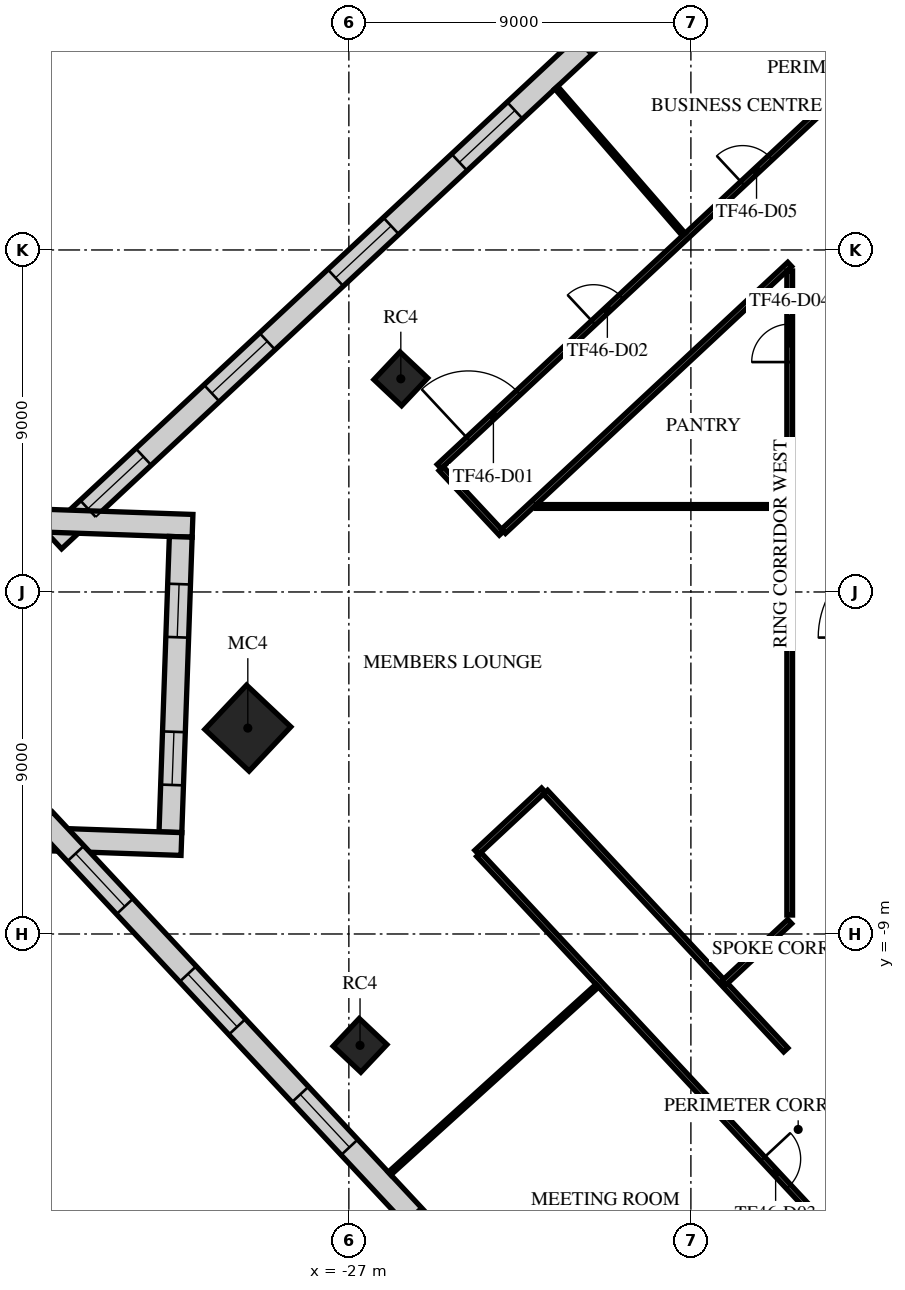
"""IFC4 building model, lengths in metres.
Left out: names, types, materials, properties, quantities, classifications, styles, units other than length and angle.
Written with IfcOpenShell. Run it as: python <this file> out.ifc"""

import sys

from ifc_helpers import new_model, si_unit, direction, frame, frame_2d, origin, origin_2d, place, context, subcontext, project, spatial, rectangle, extrude, element, fill, save


model = new_model("IFC4")
c1 = context("Model", 3, precision=1e-05, world=origin(), true_north=direction((0.0, 1.0)))
c2 = subcontext(c1, "Body", "Model", "MODEL_VIEW")
j1 = project(units=[si_unit("LENGTHUNIT", "METRE"), si_unit("PLANEANGLEUNIT", "RADIAN")], contexts=[c1])
p1 = place(None, origin())
s1 = spatial("IfcSite", under=j1, at=p1, CompositionType="ELEMENT")
p2 = place(p1, origin())
s2 = spatial("IfcBuilding", under=s1, at=p2, CompositionType="ELEMENT")
p3 = place(p2, frame((0.0, 0.0, 197.3)))
s3 = spatial("IfcBuildingStorey", under=s2, at=p3, CompositionType="ELEMENT", Elevation=197.3)
p4 = place(p3, frame((-25.633, 5.609, 0.0), z_axis=(0.0, 0.0, 1.0), x_axis=(0.685916152371, 0.727680583715, 0.0)))
e1 = element("IfcColumn", 1, at=p4, inside=s3, PredefinedType="COLUMN", context=c2, shape_type="SweptSolid", body=[
    extrude(rectangle(XDim=1.0, YDim=1.0, at=origin_2d()), origin(), (0.0, 0.0, 1.0), 4.0),
])
p5 = place(p3, frame((-29.659, -3.582, 0.0), z_axis=(0.0, 0.0, 1.0), x_axis=(0.685916152371, 0.727680583715, 0.0)))
e2 = element("IfcColumn", 2, at=p5, inside=s3, PredefinedType="COLUMN", context=c2, shape_type="SweptSolid", body=[
    extrude(rectangle(XDim=1.6, YDim=1.6, at=origin_2d()), origin(), (0.0, 0.0, 1.0), 4.0),
])
p6 = place(p3, frame((-26.706, -11.931, 0.0), z_axis=(0.0, 0.0, 1.0), x_axis=(0.685916152371, 0.727680583715, 0.0)))
e3 = element("IfcColumn", 3, at=p6, inside=s3, PredefinedType="COLUMN", context=c2, shape_type="SweptSolid", body=[
    extrude(rectangle(XDim=1.0, YDim=1.0, at=origin_2d()), origin(), (0.0, 0.0, 1.0), 4.0),
])
p7 = place(p3, frame((1.073, 34.773, 0.0), z_axis=(0.0, 0.0, 1.0), x_axis=(-0.731351780381, -0.682000420333, 0.0)))
e4 = element("IfcWall", 4, at=p7, inside=s3, PredefinedType="STANDARD", context=c2, shape_type="SweptSolid", body=[
    extrude(rectangle(XDim=49.0, YDim=0.6, at=frame_2d((24.5, 0.0))), origin(), (0.0, 0.0, 1.0), 3.62),
])
p8 = place(p7, frame((1.227, 0.0, 0.9)))
e5 = element("IfcOpeningElement", 5, at=p8, cuts=e4, PredefinedType="OPENING", context=c2, shape_type="SweptSolid", body=[
    extrude(rectangle(XDim=2.0, YDim=2.1, at=frame_2d((1.0, 1.05))), frame((0.0, 0.31, 0.0), z_axis=(0.0, -1.0, 0.0), x_axis=(1.0, 0.0, 0.0)), (0.0, 0.0, 1.0), 0.62),
])
p9 = place(p7, frame((5.682, 0.0, 0.9)))
e6 = element("IfcOpeningElement", 6, at=p9, cuts=e4, PredefinedType="OPENING", context=c2, shape_type="SweptSolid", body=[
    extrude(rectangle(XDim=2.0, YDim=2.1, at=frame_2d((1.0, 1.05))), frame((0.0, 0.31, 0.0), z_axis=(0.0, -1.0, 0.0), x_axis=(1.0, 0.0, 0.0)), (0.0, 0.0, 1.0), 0.62),
])
p10 = place(p7, frame((14.591, 0.0, 0.9)))
e7 = element("IfcOpeningElement", 7, at=p10, cuts=e4, PredefinedType="OPENING", context=c2, shape_type="SweptSolid", body=[
    extrude(rectangle(XDim=2.0, YDim=2.1, at=frame_2d((1.0, 1.05))), frame((0.0, 0.31, 0.0), z_axis=(0.0, -1.0, 0.0), x_axis=(1.0, 0.0, 0.0)), (0.0, 0.0, 1.0), 0.62),
])
p11 = place(p7, frame((19.045, 0.0, 0.9)))
e8 = element("IfcOpeningElement", 8, at=p11, cuts=e4, PredefinedType="OPENING", context=c2, shape_type="SweptSolid", body=[
    extrude(rectangle(XDim=2.0, YDim=2.1, at=frame_2d((1.0, 1.05))), frame((0.0, 0.31, 0.0), z_axis=(0.0, -1.0, 0.0), x_axis=(1.0, 0.0, 0.0)), (0.0, 0.0, 1.0), 0.62),
])
p12 = place(p7, frame((23.5, 0.0, 0.9)))
e9 = element("IfcOpeningElement", 9, at=p12, cuts=e4, PredefinedType="OPENING", context=c2, shape_type="SweptSolid", body=[
    extrude(rectangle(XDim=2.0, YDim=2.1, at=frame_2d((1.0, 1.05))), frame((0.0, 0.31, 0.0), z_axis=(0.0, -1.0, 0.0), x_axis=(1.0, 0.0, 0.0)), (0.0, 0.0, 1.0), 0.62),
])
p13 = place(p7, frame((27.955, 0.0, 0.9)))
e10 = element("IfcOpeningElement", 10, at=p13, cuts=e4, PredefinedType="OPENING", context=c2, shape_type="SweptSolid", body=[
    extrude(rectangle(XDim=2.0, YDim=2.1, at=frame_2d((1.0, 1.05))), frame((0.0, 0.31, 0.0), z_axis=(0.0, -1.0, 0.0), x_axis=(1.0, 0.0, 0.0)), (0.0, 0.0, 1.0), 0.62),
])
p14 = place(p7, frame((32.409, 0.0, 0.9)))
e11 = element("IfcOpeningElement", 11, at=p14, cuts=e4, PredefinedType="OPENING", context=c2, shape_type="SweptSolid", body=[
    extrude(rectangle(XDim=2.0, YDim=2.1, at=frame_2d((1.0, 1.05))), frame((0.0, 0.31, 0.0), z_axis=(0.0, -1.0, 0.0), x_axis=(1.0, 0.0, 0.0)), (0.0, 0.0, 1.0), 0.62),
])
p15 = place(p7, frame((36.864, 0.0, 0.9)))
e12 = element("IfcOpeningElement", 12, at=p15, cuts=e4, PredefinedType="OPENING", context=c2, shape_type="SweptSolid", body=[
    extrude(rectangle(XDim=2.0, YDim=2.1, at=frame_2d((1.0, 1.05))), frame((0.0, 0.31, 0.0), z_axis=(0.0, -1.0, 0.0), x_axis=(1.0, 0.0, 0.0)), (0.0, 0.0, 1.0), 0.62),
])
p16 = place(p7, frame((41.318, 0.0, 0.9)))
e13 = element("IfcOpeningElement", 13, at=p16, cuts=e4, PredefinedType="OPENING", context=c2, shape_type="SweptSolid", body=[
    extrude(rectangle(XDim=2.0, YDim=2.1, at=frame_2d((1.0, 1.05))), frame((0.0, 0.31, 0.0), z_axis=(0.0, -1.0, 0.0), x_axis=(1.0, 0.0, 0.0)), (0.0, 0.0, 1.0), 0.62),
])
p17 = place(p7, frame((45.773, 0.0, 0.9)))
e14 = element("IfcOpeningElement", 14, at=p17, cuts=e4, PredefinedType="OPENING", context=c2, shape_type="SweptSolid", body=[
    extrude(rectangle(XDim=2.0, YDim=2.1, at=frame_2d((1.0, 1.05))), frame((0.0, 0.31, 0.0), z_axis=(0.0, -1.0, 0.0), x_axis=(1.0, 0.0, 0.0)), (0.0, 0.0, 1.0), 0.62),
])
p18 = place(p3, frame((-34.958, 1.875, 0.0), z_axis=(0.0, 0.0, 1.0), x_axis=(0.999390522456, -0.034908217157, 0.0)))
e15 = element("IfcWall", 15, at=p18, inside=s3, PredefinedType="STANDARD", context=c2, shape_type="SweptSolid", body=[
    extrude(rectangle(XDim=3.847, YDim=0.6, at=frame_2d((1.923, 0.0))), origin(), (0.0, 0.0, 1.0), 3.62),
])
p19 = place(p3, frame((-31.424, 1.451, 0.0), z_axis=(0.0, 0.0, 1.0), x_axis=(-0.034903343287, -0.999390692686, 0.0)))
e16 = element("IfcWall", 16, at=p19, inside=s3, PredefinedType="STANDARD", context=c2, shape_type="SweptSolid", body=[
    extrude(rectangle(XDim=7.778, YDim=0.6, at=frame_2d((3.889, 0.0))), origin(), (0.0, 0.0, 1.0), 3.62),
])
p20 = place(p19, frame((1.244, 0.0, 0.9)))
e17 = element("IfcOpeningElement", 17, at=p20, cuts=e16, PredefinedType="OPENING", context=c2, shape_type="SweptSolid", body=[
    extrude(rectangle(XDim=1.4, YDim=2.1, at=frame_2d((0.7, 1.05))), frame((0.0, 0.31, 0.0), z_axis=(0.0, -1.0, 0.0), x_axis=(1.0, 0.0, 0.0)), (0.0, 0.0, 1.0), 0.62),
])
p21 = place(p19, frame((5.134, 0.0, 0.9)))
e18 = element("IfcOpeningElement", 18, at=p21, cuts=e16, PredefinedType="OPENING", context=c2, shape_type="SweptSolid", body=[
    extrude(rectangle(XDim=1.4, YDim=2.1, at=frame_2d((0.7, 1.05))), frame((0.0, 0.31, 0.0), z_axis=(0.0, -1.0, 0.0), x_axis=(1.0, 0.0, 0.0)), (0.0, 0.0, 1.0), 0.62),
])
p22 = place(p3, frame((-31.406, -6.633, 0.0), z_axis=(0.0, 0.0, 1.0), x_axis=(-0.999390445106, 0.034910431553, 0.0)))
e19 = element("IfcWall", 19, at=p22, inside=s3, PredefinedType="STANDARD", context=c2, shape_type="SweptSolid", body=[
    extrude(rectangle(XDim=3.846, YDim=0.6, at=frame_2d((1.923, 0.0))), origin(), (0.0, 0.0, 1.0), 3.62),
])
p23 = place(p3, frame((-35.02, -5.994, 0.0), z_axis=(0.0, 0.0, 1.0), x_axis=(0.682002361324, -0.731349970362, 0.0)))
e20 = element("IfcWall", 20, at=p23, inside=s3, PredefinedType="STANDARD", context=c2, shape_type="SweptSolid", body=[
    extrude(rectangle(XDim=39.0, YDim=0.6, at=frame_2d((19.5, 0.0))), origin(), (0.0, 0.0, 1.0), 3.62),
])
p24 = place(p23, frame((1.217, 0.0, 0.9)))
e21 = element("IfcOpeningElement", 21, at=p24, cuts=e20, PredefinedType="OPENING", context=c2, shape_type="SweptSolid", body=[
    extrude(rectangle(XDim=1.9, YDim=2.1, at=frame_2d((0.95, 1.05))), frame((0.0, 0.31, 0.0), z_axis=(0.0, -1.0, 0.0), x_axis=(1.0, 0.0, 0.0)), (0.0, 0.0, 1.0), 0.62),
])
p25 = place(p23, frame((5.55, 0.0, 0.9)))
e22 = element("IfcOpeningElement", 22, at=p25, cuts=e20, PredefinedType="OPENING", context=c2, shape_type="SweptSolid", body=[
    extrude(rectangle(XDim=1.9, YDim=2.1, at=frame_2d((0.95, 1.05))), frame((0.0, 0.31, 0.0), z_axis=(0.0, -1.0, 0.0), x_axis=(1.0, 0.0, 0.0)), (0.0, 0.0, 1.0), 0.62),
])
p26 = place(p23, frame((9.883, 0.0, 0.9)))
e23 = element("IfcOpeningElement", 23, at=p26, cuts=e20, PredefinedType="OPENING", context=c2, shape_type="SweptSolid", body=[
    extrude(rectangle(XDim=1.9, YDim=2.1, at=frame_2d((0.95, 1.05))), frame((0.0, 0.31, 0.0), z_axis=(0.0, -1.0, 0.0), x_axis=(1.0, 0.0, 0.0)), (0.0, 0.0, 1.0), 0.62),
])
p27 = place(p23, frame((14.217, 0.0, 0.9)))
e24 = element("IfcOpeningElement", 24, at=p27, cuts=e20, PredefinedType="OPENING", context=c2, shape_type="SweptSolid", body=[
    extrude(rectangle(XDim=1.9, YDim=2.1, at=frame_2d((0.95, 1.05))), frame((0.0, 0.31, 0.0), z_axis=(0.0, -1.0, 0.0), x_axis=(1.0, 0.0, 0.0)), (0.0, 0.0, 1.0), 0.62),
])
p28 = place(p23, frame((18.55, 0.0, 0.9)))
e25 = element("IfcOpeningElement", 25, at=p28, cuts=e20, PredefinedType="OPENING", context=c2, shape_type="SweptSolid", body=[
    extrude(rectangle(XDim=1.9, YDim=2.1, at=frame_2d((0.95, 1.05))), frame((0.0, 0.31, 0.0), z_axis=(0.0, -1.0, 0.0), x_axis=(1.0, 0.0, 0.0)), (0.0, 0.0, 1.0), 0.62),
])
p29 = place(p23, frame((22.883, 0.0, 0.9)))
e26 = element("IfcOpeningElement", 26, at=p29, cuts=e20, PredefinedType="OPENING", context=c2, shape_type="SweptSolid", body=[
    extrude(rectangle(XDim=1.9, YDim=2.1, at=frame_2d((0.95, 1.05))), frame((0.0, 0.31, 0.0), z_axis=(0.0, -1.0, 0.0), x_axis=(1.0, 0.0, 0.0)), (0.0, 0.0, 1.0), 0.62),
])
p30 = place(p23, frame((27.217, 0.0, 0.9)))
e27 = element("IfcOpeningElement", 27, at=p30, cuts=e20, PredefinedType="OPENING", context=c2, shape_type="SweptSolid", body=[
    extrude(rectangle(XDim=1.9, YDim=2.1, at=frame_2d((0.95, 1.05))), frame((0.0, 0.31, 0.0), z_axis=(0.0, -1.0, 0.0), x_axis=(1.0, 0.0, 0.0)), (0.0, 0.0, 1.0), 0.62),
])
p31 = place(p23, frame((31.55, 0.0, 0.9)))
e28 = element("IfcOpeningElement", 28, at=p31, cuts=e20, PredefinedType="OPENING", context=c2, shape_type="SweptSolid", body=[
    extrude(rectangle(XDim=1.9, YDim=2.1, at=frame_2d((0.95, 1.05))), frame((0.0, 0.31, 0.0), z_axis=(0.0, -1.0, 0.0), x_axis=(1.0, 0.0, 0.0)), (0.0, 0.0, 1.0), 0.62),
])
p32 = place(p23, frame((35.883, 0.0, 0.9)))
e29 = element("IfcOpeningElement", 29, at=p32, cuts=e20, PredefinedType="OPENING", context=c2, shape_type="SweptSolid", body=[
    extrude(rectangle(XDim=1.9, YDim=2.1, at=frame_2d((0.95, 1.05))), frame((0.0, 0.31, 0.0), z_axis=(0.0, -1.0, 0.0), x_axis=(1.0, 0.0, 0.0)), (0.0, 0.0, 1.0), 0.62),
])
p33 = place(p3, frame((-24.623, 3.301, 0.0), z_axis=(0.0, 0.0, 1.0), x_axis=(0.731351215564, 0.68200102602, 0.0)))
e30 = element("IfcWall", 30, at=p33, inside=s3, PredefinedType="PARTITIONING", context=c2, shape_type="SweptSolid", body=[
    extrude(rectangle(XDim=31.513, YDim=0.15, at=frame_2d((15.757, 0.0))), origin(), (0.0, 0.0, 1.0), 3.17),
])
p34 = place(p33, frame((1.05, 0.0, 0.0)))
e31 = element("IfcOpeningElement", 31, at=p34, cuts=e30, PredefinedType="OPENING", context=c2, shape_type="SweptSolid", body=[
    extrude(rectangle(XDim=1.8, YDim=2.1, at=frame_2d((0.9, 1.05))), frame((0.0, 0.085, 0.0), z_axis=(0.0, -1.0, 0.0), x_axis=(1.0, 0.0, 0.0)), (0.0, 0.0, 1.0), 0.17),
])
p35 = place(p33, frame((5.55, 0.0, 0.0)))
e32 = element("IfcOpeningElement", 32, at=p35, cuts=e30, PredefinedType="OPENING", context=c2, shape_type="SweptSolid", body=[
    extrude(rectangle(XDim=1.0, YDim=2.1, at=frame_2d((0.5, 1.05))), frame((0.0, 0.085, 0.0), z_axis=(0.0, -1.0, 0.0), x_axis=(1.0, 0.0, 0.0)), (0.0, 0.0, 1.0), 0.17),
])
p36 = place(p33, frame((10.917, 0.0, 0.0)))
e33 = element("IfcOpeningElement", 33, at=p36, cuts=e30, PredefinedType="OPENING", context=c2, shape_type="SweptSolid", body=[
    extrude(rectangle(XDim=1.0, YDim=2.1, at=frame_2d((0.5, 1.05))), frame((0.0, 0.085, 0.0), z_axis=(0.0, -1.0, 0.0), x_axis=(1.0, 0.0, 0.0)), (0.0, 0.0, 1.0), 0.17),
])
p37 = place(p33, frame((20.812, 0.0, 0.0)))
e34 = element("IfcOpeningElement", 34, at=p37, cuts=e30, PredefinedType="OPENING", context=c2, shape_type="SweptSolid", body=[
    extrude(rectangle(XDim=1.0, YDim=2.1, at=frame_2d((0.5, 1.05))), frame((0.0, 0.085, 0.0), z_axis=(0.0, -1.0, 0.0), x_axis=(1.0, 0.0, 0.0)), (0.0, 0.0, 1.0), 0.17),
])
p38 = place(p3, frame((-24.572, 3.246, 0.0), z_axis=(0.0, 0.0, 1.0), x_axis=(0.682052557528, -0.73130315791, 0.0)))
e35 = element("IfcWall", 35, at=p38, inside=s3, PredefinedType="PARTITIONING", context=c2, shape_type="SweptSolid", body=[
    extrude(rectangle(XDim=2.325, YDim=0.15, at=frame_2d((1.163, 0.0))), origin(), (0.0, 0.0, 1.0), 3.17),
])
p39 = place(p3, frame((-23.633, -6.852, 0.0), z_axis=(0.0, 0.0, 1.0), x_axis=(0.731295398421, 0.682060877231, 0.0)))
e36 = element("IfcWall", 36, at=p39, inside=s3, PredefinedType="PARTITIONING", context=c2, shape_type="SweptSolid", body=[
    extrude(rectangle(XDim=2.4, YDim=0.15, at=frame_2d((1.2, 0.0))), origin(), (0.0, 0.0, 1.0), 3.62),
])
p40 = place(p3, frame((-23.582, -6.907, 0.0), z_axis=(0.0, 0.0, 1.0), x_axis=(0.68201130552, -0.73134162957, 0.0)))
e37 = element("IfcWall", 37, at=p40, inside=s3, PredefinedType="PARTITIONING", context=c2, shape_type="SweptSolid", body=[
    extrude(rectangle(XDim=22.137, YDim=0.15, at=frame_2d((11.069, 0.0))), origin(), (0.0, 0.0, 1.0), 3.17),
])
p41 = place(p40, frame((10.953, 0.0, 0.0)))
e38 = element("IfcOpeningElement", 38, at=p41, cuts=e37, PredefinedType="OPENING", context=c2, shape_type="SweptSolid", body=[
    extrude(rectangle(XDim=1.0, YDim=2.1, at=frame_2d((0.5, 1.05))), frame((0.0, 0.085, 0.0), z_axis=(0.0, -1.0, 0.0), x_axis=(1.0, 0.0, 0.0)), (0.0, 0.0, 1.0), 0.17),
])
p42 = place(p3, frame((-22.931, 1.597, 0.0), z_axis=(0.0, 0.0, 1.0), x_axis=(0.73135636677, 0.681995502027, 0.0)))
e39 = element("IfcWall", 39, at=p42, inside=s3, PredefinedType="PARTITIONING", context=c2, shape_type="SweptSolid", body=[
    extrude(rectangle(XDim=10.298, YDim=0.15, at=frame_2d((5.149, 0.0))), origin(), (0.0, 0.0, 1.0), 3.17),
])
p43 = place(p3, frame((-21.827, -5.27, 0.0), z_axis=(0.0, 0.0, 1.0), x_axis=(0.682018934887, -0.731334514744, 0.0)))
e40 = element("IfcWall", 40, at=p43, inside=s3, PredefinedType="PARTITIONING", context=c2, shape_type="SweptSolid", body=[
    extrude(rectangle(XDim=9.272, YDim=0.15, at=frame_2d((4.636, 0.0))), origin(), (0.0, 0.0, 1.0), 3.17),
])
p44 = place(p3, frame((-17.14, -10.295, 0.0), z_axis=(0.0, 0.0, 1.0), x_axis=(0.731509059071, 0.681831721539, 0.0)))
e41 = element("IfcWall", 41, at=p44, inside=s3, PredefinedType="PARTITIONING", context=c2, shape_type="SweptSolid", body=[
    extrude(rectangle(XDim=2.379, YDim=0.15, at=frame_2d((1.189, 0.0))), origin(), (0.0, 0.0, 1.0), 3.62),
])
p45 = place(p3, frame((-15.4, -8.5, 0.0), z_axis=(0.0, 0.0, 1.0), x_axis=(0.0, 1.0, 0.0)))
e42 = element("IfcWall", 42, at=p45, inside=s3, PredefinedType="PARTITIONING", context=c2, shape_type="SweptSolid", body=[
    extrude(rectangle(XDim=16.948, YDim=0.15, at=frame_2d((8.474, 0.0))), origin(), (0.0, 0.0, 1.0), 3.17),
])
p46 = place(p45, frame((14.551, 0.0, 0.0)))
e43 = element("IfcOpeningElement", 43, at=p46, cuts=e42, PredefinedType="OPENING", context=c2, shape_type="SweptSolid", body=[
    extrude(rectangle(XDim=1.0, YDim=2.1, at=frame_2d((0.5, 1.05))), frame((0.0, 0.085, 0.0), z_axis=(0.0, -1.0, 0.0), x_axis=(1.0, 0.0, 0.0)), (0.0, 0.0, 1.0), 0.17),
])
p47 = place(p3, frame((-25.927, -15.302, 0.0), z_axis=(0.0, 0.0, 1.0), x_axis=(0.741648836196, 0.670788344986, 0.0)))
e44 = element("IfcWall", 44, at=p47, inside=s3, PredefinedType="PARTITIONING", context=c2, shape_type="SweptSolid", body=[
    extrude(rectangle(XDim=7.366, YDim=0.1, at=frame_2d((3.683, 0.0))), origin(), (0.0, 0.0, 1.0), 2.97),
])
p48 = place(p3, frame((-22.067, 2.25, 0.0), z_axis=(0.0, 0.0, 1.0), x_axis=(1.0, 0.0, 0.0)))
e45 = element("IfcWall", 45, at=p48, inside=s3, PredefinedType="PARTITIONING", context=c2, shape_type="SweptSolid", body=[
    extrude(rectangle(XDim=6.592, YDim=0.1, at=frame_2d((3.296, 0.0))), origin(), (0.0, 0.0, 1.0), 3.62),
])
p49 = place(p3, frame((-21.542, 13.272, 0.0), z_axis=(0.0, 0.0, 1.0), x_axis=(0.655282861231, -0.755383592472, 0.0)))
e46 = element("IfcWall", 46, at=p49, inside=s3, PredefinedType="PARTITIONING", context=c2, shape_type="SweptSolid", body=[
    extrude(rectangle(XDim=5.117, YDim=0.1, at=frame_2d((2.559, 0.0))), origin(), (0.0, 0.0, 1.0), 2.97),
])
p50 = place(p14, origin())
e47 = element("IfcWindow", 47, at=p50, inside=s3, PartitioningType="SINGLE_PANEL", PredefinedType="WINDOW", context=c2, shape_type="SweptSolid", body=[
    extrude(rectangle(XDim=2.0, YDim=2.1, at=frame_2d((1.0, 1.05))), frame((0.0, 0.03, 0.0), z_axis=(0.0, -1.0, 0.0), x_axis=(1.0, 0.0, 0.0)), (0.0, 0.0, 1.0), 0.06),
])
fill(e11, e47)
p51 = place(p15, origin())
e48 = element("IfcWindow", 48, at=p51, inside=s3, PartitioningType="SINGLE_PANEL", PredefinedType="WINDOW", context=c2, shape_type="SweptSolid", body=[
    extrude(rectangle(XDim=2.0, YDim=2.1, at=frame_2d((1.0, 1.05))), frame((0.0, 0.03, 0.0), z_axis=(0.0, -1.0, 0.0), x_axis=(1.0, 0.0, 0.0)), (0.0, 0.0, 1.0), 0.06),
])
fill(e12, e48)
p52 = place(p16, origin())
e49 = element("IfcWindow", 49, at=p52, inside=s3, PartitioningType="SINGLE_PANEL", PredefinedType="WINDOW", context=c2, shape_type="SweptSolid", body=[
    extrude(rectangle(XDim=2.0, YDim=2.1, at=frame_2d((1.0, 1.05))), frame((0.0, 0.03, 0.0), z_axis=(0.0, -1.0, 0.0), x_axis=(1.0, 0.0, 0.0)), (0.0, 0.0, 1.0), 0.06),
])
fill(e13, e49)
p53 = place(p17, origin())
e50 = element("IfcWindow", 50, at=p53, inside=s3, PartitioningType="SINGLE_PANEL", PredefinedType="WINDOW", context=c2, shape_type="SweptSolid", body=[
    extrude(rectangle(XDim=2.0, YDim=2.1, at=frame_2d((1.0, 1.05))), frame((0.0, 0.03, 0.0), z_axis=(0.0, -1.0, 0.0), x_axis=(1.0, 0.0, 0.0)), (0.0, 0.0, 1.0), 0.06),
])
fill(e14, e50)
p54 = place(p20, origin())
e51 = element("IfcWindow", 51, at=p54, inside=s3, PartitioningType="SINGLE_PANEL", PredefinedType="WINDOW", context=c2, shape_type="SweptSolid", body=[
    extrude(rectangle(XDim=1.4, YDim=2.1, at=frame_2d((0.7, 1.05))), frame((0.0, 0.03, 0.0), z_axis=(0.0, -1.0, 0.0), x_axis=(1.0, 0.0, 0.0)), (0.0, 0.0, 1.0), 0.06),
])
fill(e17, e51)
p55 = place(p21, origin())
e52 = element("IfcWindow", 52, at=p55, inside=s3, PartitioningType="SINGLE_PANEL", PredefinedType="WINDOW", context=c2, shape_type="SweptSolid", body=[
    extrude(rectangle(XDim=1.4, YDim=2.1, at=frame_2d((0.7, 1.05))), frame((0.0, 0.03, 0.0), z_axis=(0.0, -1.0, 0.0), x_axis=(1.0, 0.0, 0.0)), (0.0, 0.0, 1.0), 0.06),
])
fill(e18, e52)
p56 = place(p24, origin())
e53 = element("IfcWindow", 53, at=p56, inside=s3, PartitioningType="SINGLE_PANEL", PredefinedType="WINDOW", context=c2, shape_type="SweptSolid", body=[
    extrude(rectangle(XDim=1.9, YDim=2.1, at=frame_2d((0.95, 1.05))), frame((0.0, 0.03, 0.0), z_axis=(0.0, -1.0, 0.0), x_axis=(1.0, 0.0, 0.0)), (0.0, 0.0, 1.0), 0.06),
])
fill(e21, e53)
p57 = place(p25, origin())
e54 = element("IfcWindow", 54, at=p57, inside=s3, PartitioningType="SINGLE_PANEL", PredefinedType="WINDOW", context=c2, shape_type="SweptSolid", body=[
    extrude(rectangle(XDim=1.9, YDim=2.1, at=frame_2d((0.95, 1.05))), frame((0.0, 0.03, 0.0), z_axis=(0.0, -1.0, 0.0), x_axis=(1.0, 0.0, 0.0)), (0.0, 0.0, 1.0), 0.06),
])
fill(e22, e54)
p58 = place(p26, origin())
e55 = element("IfcWindow", 55, at=p58, inside=s3, PartitioningType="SINGLE_PANEL", PredefinedType="WINDOW", context=c2, shape_type="SweptSolid", body=[
    extrude(rectangle(XDim=1.9, YDim=2.1, at=frame_2d((0.95, 1.05))), frame((0.0, 0.03, 0.0), z_axis=(0.0, -1.0, 0.0), x_axis=(1.0, 0.0, 0.0)), (0.0, 0.0, 1.0), 0.06),
])
fill(e23, e55)
p59 = place(p34, origin())
e56 = element("IfcDoor", 56, at=p59, inside=s3, OperationType="DOUBLE_DOOR_SINGLE_SWING", PredefinedType="DOOR", context=c2, shape_type="SweptSolid", body=[
    extrude(rectangle(XDim=1.8, YDim=2.1, at=frame_2d((0.9, 1.05))), frame((0.0, 0.025, 0.0), z_axis=(0.0, -1.0, 0.0), x_axis=(1.0, 0.0, 0.0)), (0.0, 0.0, 1.0), 0.05),
])
fill(e31, e56)
p60 = place(p35, origin())
e57 = element("IfcDoor", 57, at=p60, inside=s3, OperationType="SINGLE_SWING_LEFT", PredefinedType="DOOR", context=c2, shape_type="SweptSolid", body=[
    extrude(rectangle(XDim=1.0, YDim=2.1, at=frame_2d((0.5, 1.05))), frame((0.0, 0.025, 0.0), z_axis=(0.0, -1.0, 0.0), x_axis=(1.0, 0.0, 0.0)), (0.0, 0.0, 1.0), 0.05),
])
fill(e32, e57)
p61 = place(p41, frame((1.0, 0.0, 0.0), z_axis=(0.0, 0.0, 1.0), x_axis=(-1.0, 0.0, 0.0)))
e58 = element("IfcDoor", 58, at=p61, inside=s3, OperationType="SINGLE_SWING_RIGHT", PredefinedType="DOOR", context=c2, shape_type="SweptSolid", body=[
    extrude(rectangle(XDim=1.0, YDim=2.1, at=frame_2d((0.5, 1.05))), frame((0.0, 0.025, 0.0), z_axis=(0.0, -1.0, 0.0), x_axis=(1.0, 0.0, 0.0)), (0.0, 0.0, 1.0), 0.05),
])
fill(e38, e58)
p62 = place(p46, origin())
e59 = element("IfcDoor", 59, at=p62, inside=s3, OperationType="SINGLE_SWING_RIGHT", PredefinedType="DOOR", context=c2, shape_type="SweptSolid", body=[
    extrude(rectangle(XDim=1.0, YDim=2.1, at=frame_2d((0.5, 1.05))), frame((0.0, 0.025, 0.0), z_axis=(0.0, -1.0, 0.0), x_axis=(1.0, 0.0, 0.0)), (0.0, 0.0, 1.0), 0.05),
])
fill(e43, e59)
p63 = place(p36, origin())
e60 = element("IfcDoor", 60, at=p63, inside=s3, OperationType="SINGLE_SWING_RIGHT", PredefinedType="DOOR", context=c2, shape_type="SweptSolid", body=[
    extrude(rectangle(XDim=1.0, YDim=2.1, at=frame_2d((0.5, 1.05))), frame((0.0, 0.025, 0.0), z_axis=(0.0, -1.0, 0.0), x_axis=(1.0, 0.0, 0.0)), (0.0, 0.0, 1.0), 0.05),
])
fill(e33, e60)
save(model, sys.argv[1])
